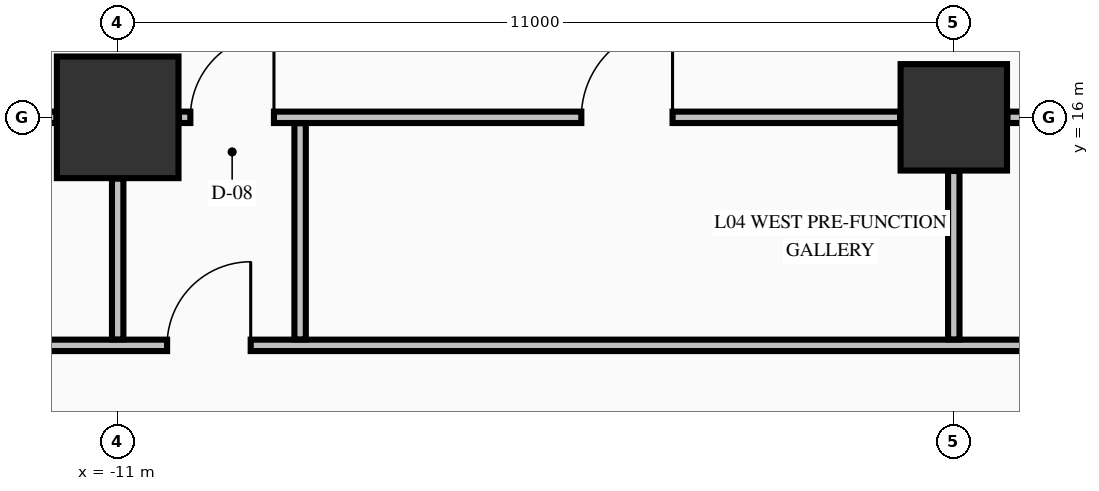
"""IFC4 building model, lengths in metres.
Left out: names, types, materials, properties, quantities, classifications, styles, units other than length and angle.
Written with IfcOpenShell. Run it as: python <this file> out.ifc"""

import sys

from ifc_helpers import new_model, si_unit, direction, frame, frame_2d, origin, origin_2d, place, context, subcontext, project, spatial, rectangle, extrude, element, fill, save


model = new_model("IFC4")
c1 = context("Model", 3, precision=1e-05, world=origin(), true_north=direction((0.0, 1.0)))
c2 = subcontext(c1, "Body", "Model", "MODEL_VIEW")
j1 = project(units=[si_unit("LENGTHUNIT", "METRE"), si_unit("PLANEANGLEUNIT", "RADIAN")], contexts=[c1])
p1 = place(None, origin())
s1 = spatial("IfcSite", under=j1, at=p1, CompositionType="ELEMENT")
p2 = place(p1, origin())
s2 = spatial("IfcBuilding", under=s1, at=p2, CompositionType="ELEMENT")
p3 = place(p2, frame((0.0, 0.0, 21.76)))
s3 = spatial("IfcBuildingStorey", under=s2, at=p3, CompositionType="ELEMENT", Elevation=21.76)
p4 = place(p3, frame((-11.0, 16.0, -0.45), z_axis=(0.0, 0.0, 1.0), x_axis=(1.0, 0.0, 0.0)))
e1 = element("IfcColumn", 1, at=p4, inside=s3, PredefinedType="COLUMN", context=c2, shape_type="SweptSolid", body=[
    extrude(rectangle(XDim=1.6, YDim=1.6, at=origin_2d()), origin(), (0.0, 0.0, 1.0), 5.44),
])
p5 = place(p3, frame((0.0, 16.0, -0.45), z_axis=(0.0, 0.0, 1.0), x_axis=(1.0, 0.0, 0.0)))
e2 = element("IfcColumn", 2, at=p5, inside=s3, PredefinedType="COLUMN", context=c2, shape_type="SweptSolid", body=[
    extrude(rectangle(XDim=1.4, YDim=1.4, at=origin_2d()), origin(), (0.0, 0.0, 1.0), 5.44),
])
p6 = place(p3, frame((-20.075, 13.0, 0.0), z_axis=(0.0, 0.0, 1.0), x_axis=(1.0, 0.0, 0.0)))
e3 = element("IfcWall", 3, at=p6, inside=s3, PredefinedType="PARTITIONING", context=c2, shape_type="SweptSolid", body=[
    extrude(rectangle(XDim=40.15, YDim=0.15, at=frame_2d((20.075, 0.0))), origin(), (0.0, 0.0, 1.0), 4.99),
])
p7 = place(p6, frame((9.725, 0.0, 0.0)))
e4 = element("IfcOpeningElement", 4, at=p7, cuts=e3, PredefinedType="OPENING", context=c2, shape_type="SweptSolid", body=[
    extrude(rectangle(XDim=1.1, YDim=2.15, at=frame_2d((0.55, 1.075))), frame((0.0, 0.085, 0.0), z_axis=(0.0, -1.0, 0.0), x_axis=(1.0, 0.0, 0.0)), (0.0, 0.0, 1.0), 0.17),
])
p8 = place(p6, frame((29.325, 0.0, 0.0)))
e5 = element("IfcOpeningElement", 5, at=p8, cuts=e3, PredefinedType="OPENING", context=c2, shape_type="SweptSolid", body=[
    extrude(rectangle(XDim=1.1, YDim=2.15, at=frame_2d((0.55, 1.075))), frame((0.0, 0.085, 0.0), z_axis=(0.0, -1.0, 0.0), x_axis=(1.0, 0.0, 0.0)), (0.0, 0.0, 1.0), 0.17),
])
p9 = place(p3, frame((-19.194, 16.0, 0.0), z_axis=(0.0, 0.0, 1.0), x_axis=(1.0, 0.0, 0.0)))
e6 = element("IfcWall", 6, at=p9, inside=s3, PredefinedType="PARTITIONING", context=c2, shape_type="SweptSolid", body=[
    extrude(rectangle(XDim=7.388, YDim=0.15, at=frame_2d((3.694, 0.0))), origin(), (0.0, 0.0, 1.0), 3.332),
])
p10 = place(p3, frame((-10.194, 16.0, 0.0), z_axis=(0.0, 0.0, 1.0), x_axis=(1.0, 0.0, 0.0)))
e7 = element("IfcWall", 7, at=p10, inside=s3, PredefinedType="PARTITIONING", context=c2, shape_type="SweptSolid", body=[
    extrude(rectangle(XDim=9.488, YDim=0.15, at=frame_2d((4.744, 0.0))), origin(), (0.0, 0.0, 1.0), 3.332),
])
p11 = place(p10, frame((0.15, 0.0, 0.0)))
e8 = element("IfcOpeningElement", 8, at=p11, cuts=e7, PredefinedType="OPENING", context=c2, shape_type="SweptSolid", body=[
    extrude(rectangle(XDim=1.1, YDim=2.15, at=frame_2d((0.55, 1.075))), frame((0.0, 0.085, 0.0), z_axis=(0.0, -1.0, 0.0), x_axis=(1.0, 0.0, 0.0)), (0.0, 0.0, 1.0), 0.17),
])
p12 = place(p10, frame((5.294, 0.0, 0.0)))
e9 = element("IfcOpeningElement", 9, at=p12, cuts=e7, PredefinedType="OPENING", context=c2, shape_type="SweptSolid", body=[
    extrude(rectangle(XDim=1.2, YDim=2.15, at=frame_2d((0.6, 1.075))), frame((0.0, 0.085, 0.0), z_axis=(0.0, -1.0, 0.0), x_axis=(1.0, 0.0, 0.0)), (0.0, 0.0, 1.0), 0.17),
])
p13 = place(p3, frame((0.706, 16.0, 0.0), z_axis=(0.0, 0.0, 1.0), x_axis=(1.0, 0.0, 0.0)))
e10 = element("IfcWall", 10, at=p13, inside=s3, PredefinedType="PARTITIONING", context=c2, shape_type="SweptSolid", body=[
    extrude(rectangle(XDim=9.488, YDim=0.15, at=frame_2d((4.744, 0.0))), origin(), (0.0, 0.0, 1.0), 3.332),
])
p14 = place(p13, frame((8.238, 0.0, 0.0)))
e11 = element("IfcOpeningElement", 11, at=p14, cuts=e10, PredefinedType="OPENING", context=c2, shape_type="SweptSolid", body=[
    extrude(rectangle(XDim=1.1, YDim=2.15, at=frame_2d((0.55, 1.075))), frame((0.0, 0.085, 0.0), z_axis=(0.0, -1.0, 0.0), x_axis=(1.0, 0.0, 0.0)), (0.0, 0.0, 1.0), 0.17),
])
p15 = place(p13, frame((2.994, 0.0, 0.0)))
e12 = element("IfcOpeningElement", 12, at=p15, cuts=e10, PredefinedType="OPENING", context=c2, shape_type="SweptSolid", body=[
    extrude(rectangle(XDim=1.2, YDim=2.15, at=frame_2d((0.6, 1.075))), frame((0.0, 0.085, 0.0), z_axis=(0.0, -1.0, 0.0), x_axis=(1.0, 0.0, 0.0)), (0.0, 0.0, 1.0), 0.17),
])
p16 = place(p3, frame((-11.0, 13.078, 0.0), z_axis=(0.0, 0.0, 1.0), x_axis=(0.0, 1.0, 0.0)))
e13 = element("IfcWall", 13, at=p16, inside=s3, PredefinedType="PARTITIONING", context=c2, shape_type="SweptSolid", body=[
    extrude(rectangle(XDim=2.116, YDim=0.15, at=frame_2d((1.058, 0.0))), origin(), (0.0, 0.0, 1.0), 3.332),
])
p17 = place(p3, frame((-8.6, 13.078, 0.0), z_axis=(0.0, 0.0, 1.0), x_axis=(0.0, 1.0, 0.0)))
e14 = element("IfcWall", 14, at=p17, inside=s3, PredefinedType="PARTITIONING", context=c2, shape_type="SweptSolid", body=[
    extrude(rectangle(XDim=2.844, YDim=0.15, at=frame_2d((1.422, 0.0))), origin(), (0.0, 0.0, 1.0), 4.99),
])
p18 = place(p3, frame((0.0, 13.078, 0.0), z_axis=(0.0, 0.0, 1.0), x_axis=(0.0, 1.0, 0.0)))
e15 = element("IfcWall", 15, at=p18, inside=s3, PredefinedType="PARTITIONING", context=c2, shape_type="SweptSolid", body=[
    extrude(rectangle(XDim=2.216, YDim=0.15, at=frame_2d((1.108, 0.0))), origin(), (0.0, 0.0, 1.0), 3.332),
])
p19 = place(p11, origin())
e16 = element("IfcDoor", 16, at=p19, inside=s3, OperationType="SINGLE_SWING_RIGHT", PredefinedType="DOOR", context=c2, shape_type="SweptSolid", body=[
    extrude(rectangle(XDim=1.1, YDim=2.15, at=frame_2d((0.55, 1.075))), frame((0.0, 0.025, 0.0), z_axis=(0.0, -1.0, 0.0), x_axis=(1.0, 0.0, 0.0)), (0.0, 0.0, 1.0), 0.05),
])
fill(e8, e16)
p20 = place(p7, origin())
e17 = element("IfcDoor", 17, at=p20, inside=s3, OperationType="SINGLE_SWING_RIGHT", PredefinedType="DOOR", context=c2, shape_type="SweptSolid", body=[
    extrude(rectangle(XDim=1.1, YDim=2.15, at=frame_2d((0.55, 1.075))), frame((0.0, 0.025, 0.0), z_axis=(0.0, -1.0, 0.0), x_axis=(1.0, 0.0, 0.0)), (0.0, 0.0, 1.0), 0.05),
])
fill(e4, e17)
p21 = place(p12, origin())
e18 = element("IfcDoor", 18, at=p21, inside=s3, OperationType="SINGLE_SWING_RIGHT", PredefinedType="DOOR", context=c2, shape_type="SweptSolid", body=[
    extrude(rectangle(XDim=1.2, YDim=2.15, at=frame_2d((0.6, 1.075))), frame((0.0, 0.025, 0.0), z_axis=(0.0, -1.0, 0.0), x_axis=(1.0, 0.0, 0.0)), (0.0, 0.0, 1.0), 0.05),
])
fill(e9, e18)
save(model, sys.argv[1])
